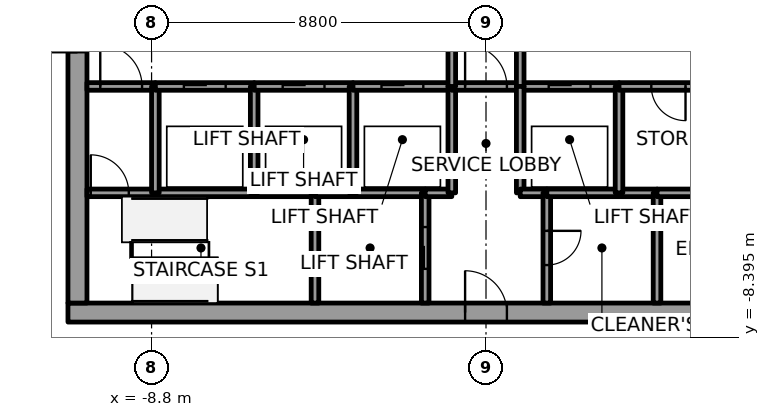
"""IFC4 building model, lengths in metres.
Left out: names, types, materials, properties, quantities, classifications, styles, units other than length and angle.
Written with IfcOpenShell. Run it as: python <this file> out.ifc"""

import sys

from ifc_helpers import new_model, si_unit, direction, frame, frame_2d, origin, place, context, subcontext, project, spatial, rectangle, extrude, element, fill, save


model = new_model("IFC4")
c1 = context("Model", 3, precision=1e-05, world=origin(), true_north=direction((0.0, 1.0)))
c2 = subcontext(c1, "Body", "Model", "MODEL_VIEW")
j1 = project(units=[si_unit("LENGTHUNIT", "METRE"), si_unit("PLANEANGLEUNIT", "RADIAN")], contexts=[c1])
p1 = place(None, origin())
s1 = spatial("IfcSite", under=j1, at=p1, CompositionType="ELEMENT")
p2 = place(p1, origin())
s2 = spatial("IfcBuilding", under=s1, at=p2, CompositionType="ELEMENT")
p3 = place(p2, frame((0.0, 0.0, 16.8)))
s3 = spatial("IfcBuildingStorey", under=s2, at=p3, CompositionType="ELEMENT", Elevation=16.8)
p4 = place(p3, frame((-11.0, -7.75, 0.0), z_axis=(0.0, 0.0, 1.0), x_axis=(1.0, 0.0, 0.0)))
e1 = element("IfcWall", 1, at=p4, inside=s3, PredefinedType="SHEAR", context=c2, shape_type="SweptSolid", body=[
    extrude(rectangle(XDim=22.0, YDim=0.5, at=frame_2d((11.0, 0.0))), origin(), (0.0, 0.0, 1.0), 5.4),
])
p5 = place(p4, frame((10.45, 0.0, 0.0)))
e2 = element("IfcOpeningElement", 2, at=p5, cuts=e1, PredefinedType="OPENING", context=c2, shape_type="SweptSolid", body=[
    extrude(rectangle(XDim=1.1, YDim=2.1, at=frame_2d((0.55, 1.05))), frame((0.0, 0.25, 0.0), z_axis=(0.0, -1.0, 0.0), x_axis=(1.0, 0.0, 0.0)), (0.0, 0.0, 1.0), 0.5),
])
p6 = place(p3, frame((-10.75, -7.5, 0.0), z_axis=(0.0, 0.0, 1.0), x_axis=(0.0, 1.0, 0.0)))
e3 = element("IfcWall", 3, at=p6, inside=s3, PredefinedType="SHEAR", context=c2, shape_type="SweptSolid", body=[
    extrude(rectangle(XDim=15.0, YDim=0.5, at=frame_2d((7.5, 0.0))), origin(), (0.0, 0.0, 1.0), 5.4),
])
p7 = place(p6, frame((6.6, 0.0, 0.0)))
e4 = element("IfcOpeningElement", 4, at=p7, cuts=e3, PredefinedType="OPENING", context=c2, shape_type="SweptSolid", body=[
    extrude(rectangle(XDim=1.8, YDim=2.1, at=frame_2d((0.9, 1.05))), frame((0.0, 0.25, 0.0), z_axis=(0.0, -1.0, 0.0), x_axis=(1.0, 0.0, 0.0)), (0.0, 0.0, 1.0), 0.5),
])
p8 = place(p3, frame((-10.5, -4.6, 0.0), z_axis=(0.0, 0.0, 1.0), x_axis=(1.0, 0.0, 0.0)))
e5 = element("IfcWall", 5, at=p8, inside=s3, PredefinedType="SOLIDWALL", context=c2, shape_type="SweptSolid", body=[
    extrude(rectangle(XDim=1.8, YDim=0.2, at=frame_2d((0.9, 0.0))), origin(), (0.0, 0.0, 1.0), 5.15),
])
p9 = place(p8, frame((0.1, 0.0, 0.0)))
e6 = element("IfcOpeningElement", 6, at=p9, cuts=e5, PredefinedType="OPENING", context=c2, shape_type="SweptSolid", body=[
    extrude(rectangle(XDim=1.0, YDim=2.1, at=frame_2d((0.5, 1.05))), frame((0.0, 0.1, 0.0), z_axis=(0.0, -1.0, 0.0), x_axis=(1.0, 0.0, 0.0)), (0.0, 0.0, 1.0), 0.2),
])
p10 = place(p3, frame((-10.5, -1.8, 0.0), z_axis=(0.0, 0.0, 1.0), x_axis=(1.0, 0.0, 0.0)))
e7 = element("IfcWall", 7, at=p10, inside=s3, PredefinedType="SOLIDWALL", context=c2, shape_type="SweptSolid", body=[
    extrude(rectangle(XDim=1.8, YDim=0.2, at=frame_2d((0.9, 0.0))), origin(), (0.0, 0.0, 1.0), 5.15),
])
p11 = place(p10, frame((0.35, 0.0, 0.0)))
e8 = element("IfcOpeningElement", 8, at=p11, cuts=e7, PredefinedType="OPENING", context=c2, shape_type="SweptSolid", body=[
    extrude(rectangle(XDim=1.1, YDim=2.4, at=frame_2d((0.55, 1.2))), frame((0.0, 0.1, 0.0), z_axis=(0.0, -1.0, 0.0), x_axis=(1.0, 0.0, 0.0)), (0.0, 0.0, 1.0), 0.2),
])
p12 = place(p3, frame((-8.7, -4.6, 0.0), z_axis=(0.0, 0.0, 1.0), x_axis=(1.0, 0.0, 0.0)))
e9 = element("IfcWall", 9, at=p12, inside=s3, PredefinedType="SOLIDWALL", context=c2, shape_type="SweptSolid", body=[
    extrude(rectangle(XDim=2.6, YDim=0.2, at=frame_2d((1.3, 0.0))), origin(), (0.0, 0.0, 1.0), 5.15),
])
p13 = place(p3, frame((-8.7, -4.6, 0.0), z_axis=(0.0, 0.0, 1.0), x_axis=(0.0, 1.0, 0.0)))
e10 = element("IfcWall", 10, at=p13, inside=s3, PredefinedType="SOLIDWALL", context=c2, shape_type="SweptSolid", body=[
    extrude(rectangle(XDim=2.8, YDim=0.2, at=frame_2d((1.4, 0.0))), origin(), (0.0, 0.0, 1.0), 5.15),
])
p14 = place(p3, frame((-8.7, -1.8, 0.0), z_axis=(0.0, 0.0, 1.0), x_axis=(1.0, 0.0, 0.0)))
e11 = element("IfcWall", 11, at=p14, inside=s3, PredefinedType="SOLIDWALL", context=c2, shape_type="SweptSolid", body=[
    extrude(rectangle(XDim=2.6, YDim=0.2, at=frame_2d((1.3, 0.0))), origin(), (0.0, 0.0, 1.0), 5.15),
])
p15 = place(p14, frame((0.75, 0.0, 0.0)))
e12 = element("IfcOpeningElement", 12, at=p15, cuts=e11, PredefinedType="OPENING", context=c2, shape_type="SweptSolid", body=[
    extrude(rectangle(XDim=1.1, YDim=2.1, at=frame_2d((0.55, 1.05))), frame((0.0, 0.1, 0.0), z_axis=(0.0, -1.0, 0.0), x_axis=(1.0, 0.0, 0.0)), (0.0, 0.0, 1.0), 0.2),
])
p16 = place(p3, frame((-6.1, -4.6, 0.0), z_axis=(0.0, 0.0, 1.0), x_axis=(1.0, 0.0, 0.0)))
e13 = element("IfcWall", 13, at=p16, inside=s3, PredefinedType="SOLIDWALL", context=c2, shape_type="SweptSolid", body=[
    extrude(rectangle(XDim=1.6, YDim=0.2, at=frame_2d((0.8, 0.0))), origin(), (0.0, 0.0, 1.0), 5.15),
])
p17 = place(p3, frame((-6.1, -4.6, 0.0), z_axis=(0.0, 0.0, 1.0), x_axis=(0.0, 1.0, 0.0)))
e14 = element("IfcWall", 14, at=p17, inside=s3, PredefinedType="SOLIDWALL", context=c2, shape_type="SweptSolid", body=[
    extrude(rectangle(XDim=2.8, YDim=0.2, at=frame_2d((1.4, 0.0))), origin(), (0.0, 0.0, 1.0), 5.15),
])
p18 = place(p3, frame((-6.1, -1.8, 0.0), z_axis=(0.0, 0.0, 1.0), x_axis=(1.0, 0.0, 0.0)))
e15 = element("IfcWall", 15, at=p18, inside=s3, PredefinedType="SOLIDWALL", context=c2, shape_type="SweptSolid", body=[
    extrude(rectangle(XDim=2.6, YDim=0.2, at=frame_2d((1.3, 0.0))), origin(), (0.0, 0.0, 1.0), 5.15),
])
p19 = place(p18, frame((0.75, 0.0, 0.0)))
e16 = element("IfcOpeningElement", 16, at=p19, cuts=e15, PredefinedType="OPENING", context=c2, shape_type="SweptSolid", body=[
    extrude(rectangle(XDim=1.1, YDim=2.1, at=frame_2d((0.55, 1.05))), frame((0.0, 0.1, 0.0), z_axis=(0.0, -1.0, 0.0), x_axis=(1.0, 0.0, 0.0)), (0.0, 0.0, 1.0), 0.2),
])
p20 = place(p3, frame((-4.5, -4.6, 0.0), z_axis=(0.0, 0.0, 1.0), x_axis=(0.0, -1.0, 0.0)))
e17 = element("IfcWall", 17, at=p20, inside=s3, PredefinedType="SOLIDWALL", context=c2, shape_type="SweptSolid", body=[
    extrude(rectangle(XDim=2.9, YDim=0.2, at=frame_2d((1.45, 0.0))), origin(), (0.0, 0.0, 1.0), 5.15),
])
p21 = place(p3, frame((-4.5, -4.6, 0.0), z_axis=(0.0, 0.0, 1.0), x_axis=(1.0, 0.0, 0.0)))
e18 = element("IfcWall", 18, at=p21, inside=s3, PredefinedType="SOLIDWALL", context=c2, shape_type="SweptSolid", body=[
    extrude(rectangle(XDim=1.0, YDim=0.2, at=frame_2d((0.5, 0.0))), origin(), (0.0, 0.0, 1.0), 5.15),
])
p22 = place(p3, frame((-3.5, -4.6, 0.0), z_axis=(0.0, 0.0, 1.0), x_axis=(1.0, 0.0, 0.0)))
e19 = element("IfcWall", 19, at=p22, inside=s3, PredefinedType="SOLIDWALL", context=c2, shape_type="SweptSolid", body=[
    extrude(rectangle(XDim=1.9, YDim=0.2, at=frame_2d((0.95, 0.0))), origin(), (0.0, 0.0, 1.0), 5.15),
])
p23 = place(p3, frame((-3.5, -4.6, 0.0), z_axis=(0.0, 0.0, 1.0), x_axis=(0.0, 1.0, 0.0)))
e20 = element("IfcWall", 20, at=p23, inside=s3, PredefinedType="SOLIDWALL", context=c2, shape_type="SweptSolid", body=[
    extrude(rectangle(XDim=2.8, YDim=0.2, at=frame_2d((1.4, 0.0))), origin(), (0.0, 0.0, 1.0), 5.15),
])
p24 = place(p3, frame((-3.5, -1.8, 0.0), z_axis=(0.0, 0.0, 1.0), x_axis=(1.0, 0.0, 0.0)))
e21 = element("IfcWall", 21, at=p24, inside=s3, PredefinedType="SOLIDWALL", context=c2, shape_type="SweptSolid", body=[
    extrude(rectangle(XDim=2.6, YDim=0.2, at=frame_2d((1.3, 0.0))), origin(), (0.0, 0.0, 1.0), 5.15),
])
p25 = place(p24, frame((0.75, 0.0, 0.0)))
e22 = element("IfcOpeningElement", 22, at=p25, cuts=e21, PredefinedType="OPENING", context=c2, shape_type="SweptSolid", body=[
    extrude(rectangle(XDim=1.1, YDim=2.1, at=frame_2d((0.55, 1.05))), frame((0.0, 0.1, 0.0), z_axis=(0.0, -1.0, 0.0), x_axis=(1.0, 0.0, 0.0)), (0.0, 0.0, 1.0), 0.2),
])
p26 = place(p3, frame((-1.6, -7.5, 0.0), z_axis=(0.0, 0.0, 1.0), x_axis=(0.0, 1.0, 0.0)))
e23 = element("IfcWall", 23, at=p26, inside=s3, PredefinedType="SOLIDWALL", context=c2, shape_type="SweptSolid", body=[
    extrude(rectangle(XDim=2.9, YDim=0.2, at=frame_2d((1.45, 0.0))), origin(), (0.0, 0.0, 1.0), 5.15),
])
p27 = place(p26, frame((0.9, 0.0, 0.0)))
e24 = element("IfcOpeningElement", 24, at=p27, cuts=e23, PredefinedType="OPENING", context=c2, shape_type="SweptSolid", body=[
    extrude(rectangle(XDim=1.1, YDim=2.1, at=frame_2d((0.55, 1.05))), frame((0.0, 0.1, 0.0), z_axis=(0.0, -1.0, 0.0), x_axis=(1.0, 0.0, 0.0)), (0.0, 0.0, 1.0), 0.2),
])
p28 = place(p3, frame((-1.6, -4.6, 0.0), z_axis=(0.0, 0.0, 1.0), x_axis=(1.0, 0.0, 0.0)))
e25 = element("IfcWall", 25, at=p28, inside=s3, PredefinedType="SOLIDWALL", context=c2, shape_type="SweptSolid", body=[
    extrude(rectangle(XDim=0.7, YDim=0.2, at=frame_2d((0.35, 0.0))), origin(), (0.0, 0.0, 1.0), 5.15),
])
p29 = place(p3, frame((-0.9, -4.6, 0.0), z_axis=(0.0, 0.0, 1.0), x_axis=(0.0, 1.0, 0.0)))
e26 = element("IfcWall", 26, at=p29, inside=s3, PredefinedType="SOLIDWALL", context=c2, shape_type="SweptSolid", body=[
    extrude(rectangle(XDim=2.8, YDim=0.2, at=frame_2d((1.4, 0.0))), origin(), (0.0, 0.0, 1.0), 5.15),
])
p30 = place(p3, frame((-0.9, -1.8, 0.0), z_axis=(0.0, 0.0, 1.0), x_axis=(1.0, 0.0, 0.0)))
e27 = element("IfcWall", 27, at=p30, inside=s3, PredefinedType="SOLIDWALL", context=c2, shape_type="SweptSolid", body=[
    extrude(rectangle(XDim=1.8, YDim=0.2, at=frame_2d((0.9, 0.0))), origin(), (0.0, 0.0, 1.0), 5.15),
])
p31 = place(p30, frame((0.35, 0.0, 0.0)))
e28 = element("IfcOpeningElement", 28, at=p31, cuts=e27, PredefinedType="OPENING", context=c2, shape_type="SweptSolid", body=[
    extrude(rectangle(XDim=1.1, YDim=2.4, at=frame_2d((0.55, 1.2))), frame((0.0, 0.1, 0.0), z_axis=(0.0, -1.0, 0.0), x_axis=(1.0, 0.0, 0.0)), (0.0, 0.0, 1.0), 0.2),
])
p32 = place(p3, frame((-0.9, 1.8, 0.0), z_axis=(0.0, 0.0, 1.0), x_axis=(0.0, -1.0, 0.0)))
e29 = element("IfcWall", 29, at=p32, inside=s3, PredefinedType="SOLIDWALL", context=c2, shape_type="SweptSolid", body=[
    extrude(rectangle(XDim=3.6, YDim=0.2, at=frame_2d((1.8, 0.0))), origin(), (0.0, 0.0, 1.0), 5.15),
])
p33 = place(p32, frame((1.05, 0.0, 0.0)))
e30 = element("IfcOpeningElement", 30, at=p33, cuts=e29, PredefinedType="OPENING", context=c2, shape_type="SweptSolid", body=[
    extrude(rectangle(XDim=1.5, YDim=2.4, at=frame_2d((0.75, 1.2))), frame((0.0, 0.1, 0.0), z_axis=(0.0, -1.0, 0.0), x_axis=(1.0, 0.0, 0.0)), (0.0, 0.0, 1.0), 0.2),
])
p34 = place(p3, frame((0.9, -1.8, 0.0), z_axis=(0.0, 0.0, 1.0), x_axis=(1.0, 0.0, 0.0)))
e31 = element("IfcWall", 31, at=p34, inside=s3, PredefinedType="SOLIDWALL", context=c2, shape_type="SweptSolid", body=[
    extrude(rectangle(XDim=2.6, YDim=0.2, at=frame_2d((1.3, 0.0))), origin(), (0.0, 0.0, 1.0), 5.15),
])
p35 = place(p34, frame((0.75, 0.0, 0.0)))
e32 = element("IfcOpeningElement", 32, at=p35, cuts=e31, PredefinedType="OPENING", context=c2, shape_type="SweptSolid", body=[
    extrude(rectangle(XDim=1.1, YDim=2.1, at=frame_2d((0.55, 1.05))), frame((0.0, 0.1, 0.0), z_axis=(0.0, -1.0, 0.0), x_axis=(1.0, 0.0, 0.0)), (0.0, 0.0, 1.0), 0.2),
])
p36 = place(p3, frame((0.9, -1.8, 0.0), z_axis=(0.0, 0.0, 1.0), x_axis=(0.0, 1.0, 0.0)))
e33 = element("IfcWall", 33, at=p36, inside=s3, PredefinedType="SOLIDWALL", context=c2, shape_type="SweptSolid", body=[
    extrude(rectangle(XDim=3.6, YDim=0.2, at=frame_2d((1.8, 0.0))), origin(), (0.0, 0.0, 1.0), 5.15),
])
p37 = place(p36, frame((1.05, 0.0, 0.0)))
e34 = element("IfcOpeningElement", 34, at=p37, cuts=e33, PredefinedType="OPENING", context=c2, shape_type="SweptSolid", body=[
    extrude(rectangle(XDim=1.5, YDim=2.4, at=frame_2d((0.75, 1.2))), frame((0.0, 0.1, 0.0), z_axis=(0.0, -1.0, 0.0), x_axis=(1.0, 0.0, 0.0)), (0.0, 0.0, 1.0), 0.2),
])
p38 = place(p3, frame((0.9, -1.8, 0.0), z_axis=(0.0, 0.0, 1.0), x_axis=(0.0, -1.0, 0.0)))
e35 = element("IfcWall", 35, at=p38, inside=s3, PredefinedType="SOLIDWALL", context=c2, shape_type="SweptSolid", body=[
    extrude(rectangle(XDim=2.8, YDim=0.2, at=frame_2d((1.4, 0.0))), origin(), (0.0, 0.0, 1.0), 5.15),
])
p39 = place(p3, frame((0.9, -4.6, 0.0), z_axis=(0.0, 0.0, 1.0), x_axis=(1.0, 0.0, 0.0)))
e36 = element("IfcWall", 36, at=p39, inside=s3, PredefinedType="SOLIDWALL", context=c2, shape_type="SweptSolid", body=[
    extrude(rectangle(XDim=0.7, YDim=0.2, at=frame_2d((0.35, 0.0))), origin(), (0.0, 0.0, 1.0), 5.15),
])
p40 = place(p3, frame((1.6, -4.6, 0.0), z_axis=(0.0, 0.0, 1.0), x_axis=(0.0, -1.0, 0.0)))
e37 = element("IfcWall", 37, at=p40, inside=s3, PredefinedType="SOLIDWALL", context=c2, shape_type="SweptSolid", body=[
    extrude(rectangle(XDim=2.9, YDim=0.2, at=frame_2d((1.45, 0.0))), origin(), (0.0, 0.0, 1.0), 5.15),
])
p41 = place(p40, frame((1.0, 0.0, 0.0)))
e38 = element("IfcOpeningElement", 38, at=p41, cuts=e37, PredefinedType="OPENING", context=c2, shape_type="SweptSolid", body=[
    extrude(rectangle(XDim=0.9, YDim=2.4, at=frame_2d((0.45, 1.2))), frame((0.0, 0.1, 0.0), z_axis=(0.0, -1.0, 0.0), x_axis=(1.0, 0.0, 0.0)), (0.0, 0.0, 1.0), 0.2),
])
p42 = place(p3, frame((3.5, -4.6, 0.0), z_axis=(0.0, 0.0, 1.0), x_axis=(-1.0, 0.0, 0.0)))
e39 = element("IfcWall", 39, at=p42, inside=s3, PredefinedType="SOLIDWALL", context=c2, shape_type="SweptSolid", body=[
    extrude(rectangle(XDim=1.9, YDim=0.2, at=frame_2d((0.95, 0.0))), origin(), (0.0, 0.0, 1.0), 5.15),
])
p43 = place(p3, frame((3.5, -4.6, 0.0), z_axis=(0.0, 0.0, 1.0), x_axis=(1.0, 0.0, 0.0)))
e40 = element("IfcWall", 40, at=p43, inside=s3, PredefinedType="SOLIDWALL", context=c2, shape_type="SweptSolid", body=[
    extrude(rectangle(XDim=1.0, YDim=0.2, at=frame_2d((0.5, 0.0))), origin(), (0.0, 0.0, 1.0), 5.15),
])
p44 = place(p3, frame((3.5, -1.8, 0.0), z_axis=(0.0, 0.0, 1.0), x_axis=(0.0, -1.0, 0.0)))
e41 = element("IfcWall", 41, at=p44, inside=s3, PredefinedType="SOLIDWALL", context=c2, shape_type="SweptSolid", body=[
    extrude(rectangle(XDim=2.8, YDim=0.2, at=frame_2d((1.4, 0.0))), origin(), (0.0, 0.0, 1.0), 5.15),
])
p45 = place(p3, frame((6.1, -1.8, 0.0), z_axis=(0.0, 0.0, 1.0), x_axis=(-1.0, 0.0, 0.0)))
e42 = element("IfcWall", 42, at=p45, inside=s3, PredefinedType="SOLIDWALL", context=c2, shape_type="SweptSolid", body=[
    extrude(rectangle(XDim=2.6, YDim=0.2, at=frame_2d((1.3, 0.0))), origin(), (0.0, 0.0, 1.0), 5.15),
])
p46 = place(p45, frame((0.85, 0.0, 0.0)))
e43 = element("IfcOpeningElement", 43, at=p46, cuts=e42, PredefinedType="OPENING", context=c2, shape_type="SweptSolid", body=[
    extrude(rectangle(XDim=0.9, YDim=2.4, at=frame_2d((0.45, 1.2))), frame((0.0, 0.1, 0.0), z_axis=(0.0, -1.0, 0.0), x_axis=(1.0, 0.0, 0.0)), (0.0, 0.0, 1.0), 0.2),
])
p47 = place(p3, frame((4.5, -7.5, 0.0), z_axis=(0.0, 0.0, 1.0), x_axis=(0.0, 1.0, 0.0)))
e44 = element("IfcWall", 44, at=p47, inside=s3, PredefinedType="SOLIDWALL", context=c2, shape_type="SweptSolid", body=[
    extrude(rectangle(XDim=2.9, YDim=0.2, at=frame_2d((1.45, 0.0))), origin(), (0.0, 0.0, 1.0), 5.15),
])
p48 = place(p3, frame((4.5, -4.6, 0.0), z_axis=(0.0, 0.0, 1.0), x_axis=(1.0, 0.0, 0.0)))
e45 = element("IfcWall", 45, at=p48, inside=s3, PredefinedType="SOLIDWALL", context=c2, shape_type="SweptSolid", body=[
    extrude(rectangle(XDim=1.6, YDim=0.2, at=frame_2d((0.8, 0.0))), origin(), (0.0, 0.0, 1.0), 5.15),
])
p49 = place(p15, origin())
e46 = element("IfcDoor", 46, at=p49, inside=s3, OperationType="SLIDING_TO_LEFT", PredefinedType="DOOR", context=c2, shape_type="SweptSolid", body=[
    extrude(rectangle(XDim=1.1, YDim=2.1, at=frame_2d((0.55, 1.05))), frame((0.0, 0.025, 0.0), z_axis=(0.0, -1.0, 0.0), x_axis=(1.0, 0.0, 0.0)), (0.0, 0.0, 1.0), 0.05),
])
fill(e12, e46)
p50 = place(p19, origin())
e47 = element("IfcDoor", 47, at=p50, inside=s3, OperationType="SLIDING_TO_RIGHT", PredefinedType="DOOR", context=c2, shape_type="SweptSolid", body=[
    extrude(rectangle(XDim=1.1, YDim=2.1, at=frame_2d((0.55, 1.05))), frame((0.0, 0.025, 0.0), z_axis=(0.0, -1.0, 0.0), x_axis=(1.0, 0.0, 0.0)), (0.0, 0.0, 1.0), 0.05),
])
fill(e16, e47)
p51 = place(p25, origin())
e48 = element("IfcDoor", 48, at=p51, inside=s3, OperationType="SLIDING_TO_RIGHT", PredefinedType="DOOR", context=c2, shape_type="SweptSolid", body=[
    extrude(rectangle(XDim=1.1, YDim=2.1, at=frame_2d((0.55, 1.05))), frame((0.0, 0.025, 0.0), z_axis=(0.0, -1.0, 0.0), x_axis=(1.0, 0.0, 0.0)), (0.0, 0.0, 1.0), 0.05),
])
fill(e22, e48)
p52 = place(p35, origin())
e49 = element("IfcDoor", 49, at=p52, inside=s3, OperationType="SLIDING_TO_LEFT", PredefinedType="DOOR", context=c2, shape_type="SweptSolid", body=[
    extrude(rectangle(XDim=1.1, YDim=2.1, at=frame_2d((0.55, 1.05))), frame((0.0, 0.025, 0.0), z_axis=(0.0, -1.0, 0.0), x_axis=(1.0, 0.0, 0.0)), (0.0, 0.0, 1.0), 0.05),
])
fill(e32, e49)
p53 = place(p27, origin())
e50 = element("IfcDoor", 50, at=p53, inside=s3, OperationType="SLIDING_TO_LEFT", PredefinedType="DOOR", context=c2, shape_type="SweptSolid", body=[
    extrude(rectangle(XDim=1.1, YDim=2.1, at=frame_2d((0.55, 1.05))), frame((0.0, 0.025, 0.0), z_axis=(0.0, -1.0, 0.0), x_axis=(1.0, 0.0, 0.0)), (0.0, 0.0, 1.0), 0.05),
])
fill(e24, e50)
p54 = place(p11, origin())
e51 = element("IfcDoor", 51, at=p54, inside=s3, OperationType="SINGLE_SWING_LEFT", PredefinedType="DOOR", context=c2, shape_type="SweptSolid", body=[
    extrude(rectangle(XDim=1.1, YDim=2.4, at=frame_2d((0.55, 1.2))), frame((0.0, 0.025, 0.0), z_axis=(0.0, -1.0, 0.0), x_axis=(1.0, 0.0, 0.0)), (0.0, 0.0, 1.0), 0.05),
])
fill(e8, e51)
p55 = place(p31, origin())
e52 = element("IfcDoor", 52, at=p55, inside=s3, OperationType="SINGLE_SWING_RIGHT", PredefinedType="DOOR", context=c2, shape_type="SweptSolid", body=[
    extrude(rectangle(XDim=1.1, YDim=2.4, at=frame_2d((0.55, 1.2))), frame((0.0, 0.025, 0.0), z_axis=(0.0, -1.0, 0.0), x_axis=(1.0, 0.0, 0.0)), (0.0, 0.0, 1.0), 0.05),
])
fill(e28, e52)
p56 = place(p9, origin())
e53 = element("IfcDoor", 53, at=p56, inside=s3, OperationType="SINGLE_SWING_LEFT", PredefinedType="DOOR", context=c2, shape_type="SweptSolid", body=[
    extrude(rectangle(XDim=1.0, YDim=2.1, at=frame_2d((0.5, 1.05))), frame((0.0, 0.025, 0.0), z_axis=(0.0, -1.0, 0.0), x_axis=(1.0, 0.0, 0.0)), (0.0, 0.0, 1.0), 0.05),
])
fill(e6, e53)
p57 = place(p46, origin())
e54 = element("IfcDoor", 54, at=p57, inside=s3, OperationType="SINGLE_SWING_RIGHT", PredefinedType="DOOR", context=c2, shape_type="SweptSolid", body=[
    extrude(rectangle(XDim=0.9, YDim=2.4, at=frame_2d((0.45, 1.2))), frame((0.0, 0.025, 0.0), z_axis=(0.0, -1.0, 0.0), x_axis=(1.0, 0.0, 0.0)), (0.0, 0.0, 1.0), 0.05),
])
fill(e43, e54)
p58 = place(p41, origin())
e55 = element("IfcDoor", 55, at=p58, inside=s3, OperationType="SINGLE_SWING_LEFT", PredefinedType="DOOR", context=c2, shape_type="SweptSolid", body=[
    extrude(rectangle(XDim=0.9, YDim=2.4, at=frame_2d((0.45, 1.2))), frame((0.0, 0.025, 0.0), z_axis=(0.0, -1.0, 0.0), x_axis=(1.0, 0.0, 0.0)), (0.0, 0.0, 1.0), 0.05),
])
fill(e38, e55)
p59 = place(p7, origin())
e56 = element("IfcDoor", 56, at=p59, inside=s3, OperationType="DOUBLE_DOOR_SINGLE_SWING", PredefinedType="DOOR", context=c2, shape_type="SweptSolid", body=[
    extrude(rectangle(XDim=1.8, YDim=2.1, at=frame_2d((0.9, 1.05))), frame((0.0, 0.025, 0.0), z_axis=(0.0, -1.0, 0.0), x_axis=(1.0, 0.0, 0.0)), (0.0, 0.0, 1.0), 0.05),
])
fill(e4, e56)
p60 = place(p5, origin())
e57 = element("IfcDoor", 57, at=p60, inside=s3, OperationType="SINGLE_SWING_LEFT", PredefinedType="DOOR", context=c2, shape_type="SweptSolid", body=[
    extrude(rectangle(XDim=1.1, YDim=2.1, at=frame_2d((0.55, 1.05))), frame((0.0, 0.025, 0.0), z_axis=(0.0, -1.0, 0.0), x_axis=(1.0, 0.0, 0.0)), (0.0, 0.0, 1.0), 0.05),
])
fill(e2, e57)
save(model, sys.argv[1])
